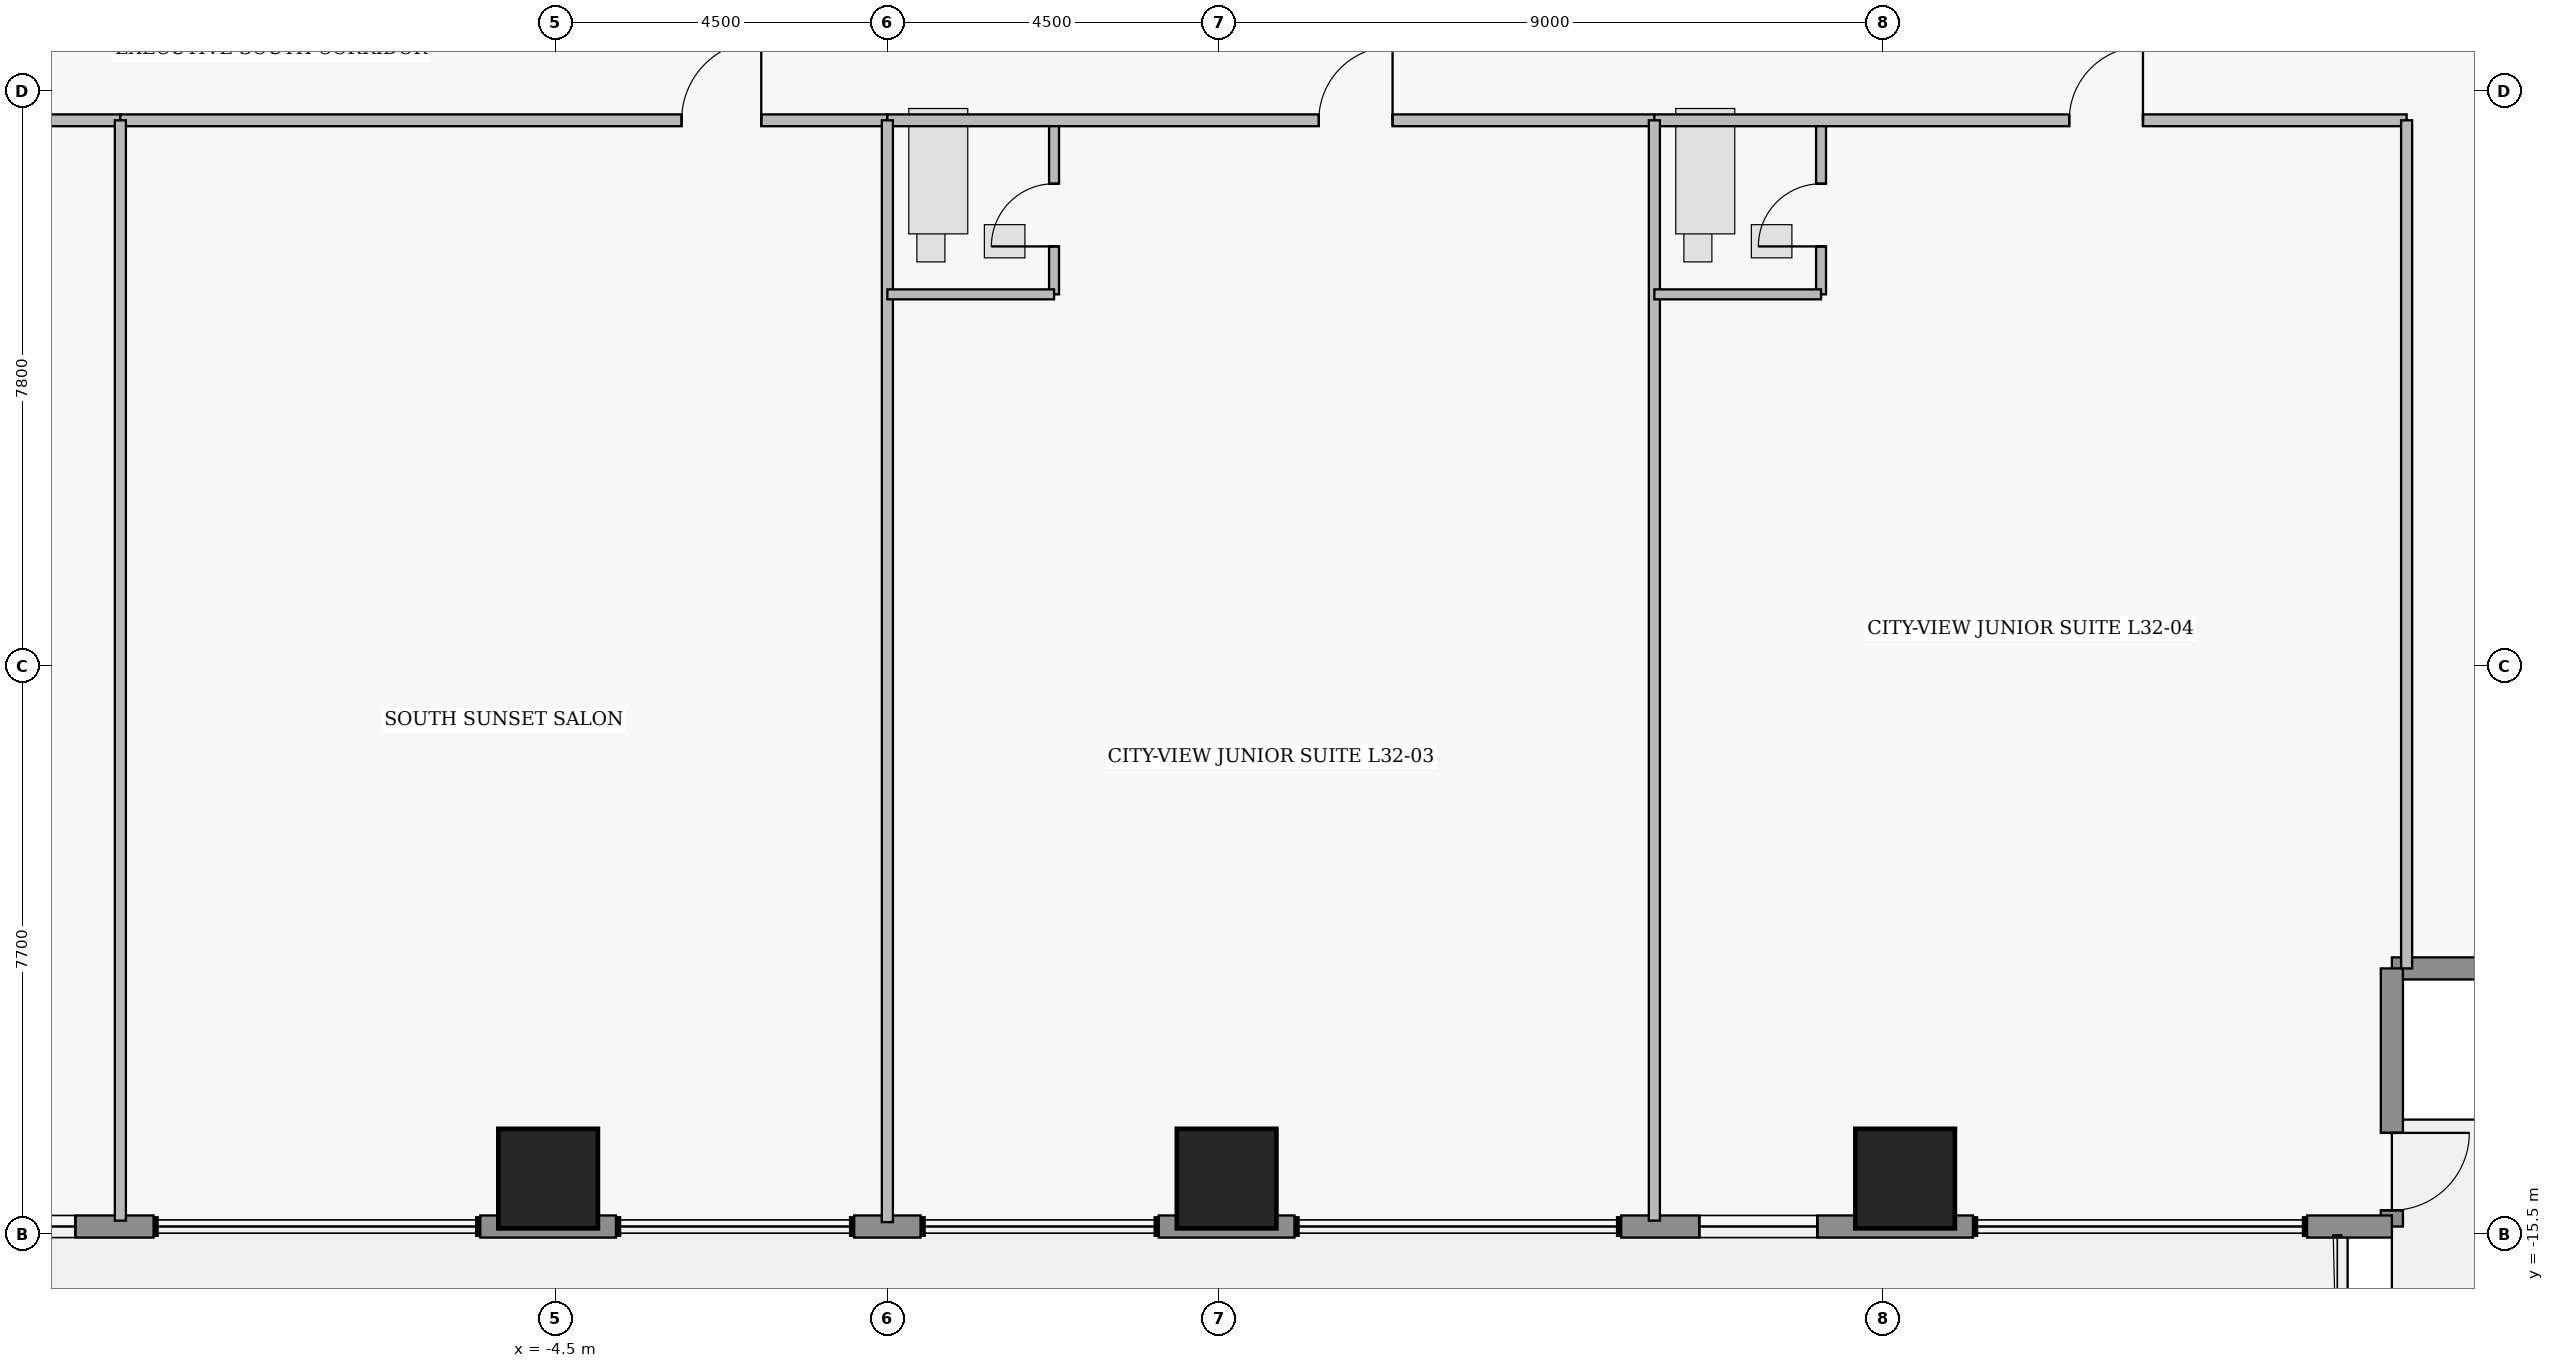
"""IFC4 building model, lengths in metres.
Left out: names, types, materials, properties, quantities, classifications, styles, units other than length and angle.
Written with IfcOpenShell. Run it as: python <this file> out.ifc"""

import sys

from ifc_helpers import new_model, si_unit, direction, frame, frame_2d, origin, origin_2d, place, context, subcontext, project, spatial, rectangle, extrude, element, fill, save


model = new_model("IFC4")
c1 = context("Model", 3, precision=1e-05, world=origin(), true_north=direction((0.0, 1.0)))
c2 = subcontext(c1, "Body", "Model", "MODEL_VIEW")
j1 = project(units=[si_unit("LENGTHUNIT", "METRE"), si_unit("PLANEANGLEUNIT", "RADIAN")], contexts=[c1])
p1 = place(None, origin())
s1 = spatial("IfcSite", under=j1, at=p1, CompositionType="ELEMENT")
p2 = place(p1, origin())
s2 = spatial("IfcBuilding", under=s1, at=p2, CompositionType="ELEMENT")
p3 = place(p2, frame((0.0, 0.0, 128.5)))
s3 = spatial("IfcBuildingStorey", under=s2, at=p3, CompositionType="ELEMENT", Elevation=128.5)
for number, where, z_axis, x_axis in (
    (1, (-4.6, -14.75, 0.0), (0.0, 0.0, 1.0), (1.0, 0.0, 0.0)),
    (2, (4.6, -14.75, 0.0), (0.0, 0.0, 1.0), (1.0, 0.0, 0.0)),
    (3, (13.8, -14.75, 0.0), (0.0, 0.0, 1.0), (1.0, 0.0, 0.0)),
):
    element("IfcColumn", number, at=place(p3, frame(where, z_axis=z_axis, x_axis=x_axis)), inside=s3, PredefinedType="COLUMN", context=c2, shape_type="SweptSolid", body=[
        extrude(rectangle(XDim=1.35, YDim=1.35, at=origin_2d()), origin(), (0.0, 0.0, 1.0), 3.65),
    ])
p4 = place(p3, frame((23.9, -11.9, 0.0), z_axis=(0.0, 0.0, 1.0), x_axis=(-1.0, 0.0, 0.0)))
e4 = element("IfcWall", 4, at=p4, inside=s3, PredefinedType="STANDARD", context=c2, shape_type="SweptSolid", body=[
    extrude(rectangle(XDim=3.5, YDim=0.3, at=frame_2d((1.75, 0.0))), origin(), (0.0, 0.0, 1.0), 3.43),
])
p5 = place(p4, frame((1.065, 0.0, 1.25)))
e5 = element("IfcOpeningElement", 5, at=p5, cuts=e4, PredefinedType="OPENING", context=c2, shape_type="SweptSolid", body=[
    extrude(rectangle(XDim=1.15, YDim=1.55, at=frame_2d((0.575, 0.775))), frame((0.0, 0.16, 0.0), z_axis=(0.0, -1.0, 0.0), x_axis=(1.0, 0.0, 0.0)), (0.0, 0.0, 1.0), 0.32),
])
p6 = place(p3, frame((20.4, -11.9, 0.0), z_axis=(0.0, 0.0, 1.0), x_axis=(0.0, -1.0, 0.0)))
e6 = element("IfcWall", 6, at=p6, inside=s3, PredefinedType="STANDARD", context=c2, shape_type="SweptSolid", body=[
    extrude(rectangle(XDim=3.5, YDim=0.3, at=frame_2d((1.75, 0.0))), origin(), (0.0, 0.0, 1.0), 3.43),
])
p7 = place(p6, frame((2.23, 0.0, 0.0)))
e7 = element("IfcOpeningElement", 7, at=p7, cuts=e6, PredefinedType="OPENING", context=c2, shape_type="SweptSolid", body=[
    extrude(rectangle(XDim=1.05, YDim=2.2, at=frame_2d((0.525, 1.1))), frame((0.0, 0.16, 0.0), z_axis=(0.0, -1.0, 0.0), x_axis=(1.0, 0.0, 0.0)), (0.0, 0.0, 1.0), 0.32),
])
p8 = place(p3, frame((20.4, -15.4, 0.0), z_axis=(0.0, 0.0, 1.0), x_axis=(-1.0, 0.0, 0.0)))
e8 = element("IfcWall", 8, at=p8, inside=s3, PredefinedType="STANDARD", context=c2, shape_type="SweptSolid", body=[
    extrude(rectangle(XDim=1.15, YDim=0.3, at=frame_2d((0.575, 0.0))), origin(), (0.0, 0.0, 1.0), 3.43),
])
p9 = place(p3, frame((14.72, -15.4, 0.0), z_axis=(0.0, 0.0, 1.0), x_axis=(-1.0, 0.0, 0.0)))
e9 = element("IfcWall", 9, at=p9, inside=s3, PredefinedType="STANDARD", context=c2, shape_type="SweptSolid", body=[
    extrude(rectangle(XDim=4.77, YDim=0.3, at=frame_2d((2.385, 0.0))), origin(), (0.0, 0.0, 1.0), 3.43),
])
p10 = place(p9, frame((2.11, 0.0, 0.85)))
e10 = element("IfcOpeningElement", 10, at=p10, cuts=e9, PredefinedType="OPENING", context=c2, shape_type="SweptSolid", body=[
    extrude(rectangle(XDim=1.6, YDim=1.8, at=frame_2d((0.8, 0.9))), frame((0.0, 0.16, 0.0), z_axis=(0.0, -1.0, 0.0), x_axis=(1.0, 0.0, 0.0)), (0.0, 0.0, 1.0), 0.32),
])
p11 = place(p3, frame((5.52, -15.4, 0.0), z_axis=(0.0, 0.0, 1.0), x_axis=(-1.0, 0.0, 0.0)))
e11 = element("IfcWall", 11, at=p11, inside=s3, PredefinedType="STANDARD", context=c2, shape_type="SweptSolid", body=[
    extrude(rectangle(XDim=1.84, YDim=0.3, at=frame_2d((0.92, 0.0))), origin(), (0.0, 0.0, 1.0), 3.43),
])
p12 = place(p3, frame((0.45, -15.4, 0.0), z_axis=(0.0, 0.0, 1.0), x_axis=(-1.0, 0.0, 0.0)))
e12 = element("IfcWall", 12, at=p12, inside=s3, PredefinedType="STANDARD", context=c2, shape_type="SweptSolid", body=[
    extrude(rectangle(XDim=0.9, YDim=0.3, at=frame_2d((0.45, 0.0))), origin(), (0.0, 0.0, 1.0), 3.43),
])
p13 = place(p3, frame((-3.68, -15.4, 0.0), z_axis=(0.0, 0.0, 1.0), x_axis=(-1.0, 0.0, 0.0)))
e13 = element("IfcWall", 13, at=p13, inside=s3, PredefinedType="STANDARD", context=c2, shape_type="SweptSolid", body=[
    extrude(rectangle(XDim=1.84, YDim=0.3, at=frame_2d((0.92, 0.0))), origin(), (0.0, 0.0, 1.0), 3.43),
])
p14 = place(p3, frame((-9.95, -15.4, 0.0), z_axis=(0.0, 0.0, 1.0), x_axis=(-1.0, 0.0, 0.0)))
e14 = element("IfcWall", 14, at=p14, inside=s3, PredefinedType="STANDARD", context=c2, shape_type="SweptSolid", body=[
    extrude(rectangle(XDim=10.45, YDim=0.3, at=frame_2d((5.225, 0.0))), origin(), (0.0, 0.0, 1.0), 3.43),
])
p15 = place(p14, frame((7.065, 0.0, 0.0)))
e15 = element("IfcOpeningElement", 15, at=p15, cuts=e14, PredefinedType="OPENING", context=c2, shape_type="SweptSolid", body=[
    extrude(rectangle(XDim=1.05, YDim=2.2, at=frame_2d((0.525, 1.1))), frame((0.0, 0.16, 0.0), z_axis=(0.0, -1.0, 0.0), x_axis=(1.0, 0.0, 0.0)), (0.0, 0.0, 1.0), 0.32),
])
p16 = place(p14, frame((1.06, 0.0, 0.85)))
e16 = element("IfcOpeningElement", 16, at=p16, cuts=e14, PredefinedType="OPENING", context=c2, shape_type="SweptSolid", body=[
    extrude(rectangle(XDim=1.6, YDim=1.8, at=frame_2d((0.8, 0.9))), frame((0.0, 0.16, 0.0), z_axis=(0.0, -1.0, 0.0), x_axis=(1.0, 0.0, 0.0)), (0.0, 0.0, 1.0), 0.32),
])
p17 = place(p14, frame((5.107, 0.0, 0.95)))
e17 = element("IfcOpeningElement", 17, at=p17, cuts=e14, PredefinedType="OPENING", context=c2, shape_type="SweptSolid", body=[
    extrude(rectangle(XDim=1.15, YDim=1.55, at=frame_2d((0.575, 0.775))), frame((0.0, 0.16, 0.0), z_axis=(0.0, -1.0, 0.0), x_axis=(1.0, 0.0, 0.0)), (0.0, 0.0, 1.0), 0.32),
])
p18 = place(p14, frame((8.712, 0.0, 0.95)))
e18 = element("IfcOpeningElement", 18, at=p18, cuts=e14, PredefinedType="OPENING", context=c2, shape_type="SweptSolid", body=[
    extrude(rectangle(XDim=1.15, YDim=1.55, at=frame_2d((0.575, 0.775))), frame((0.0, 0.16, 0.0), z_axis=(0.0, -1.0, 0.0), x_axis=(1.0, 0.0, 0.0)), (0.0, 0.0, 1.0), 0.32),
])
p19 = place(p3, frame((-20.6, -0.4, 0.0), z_axis=(0.0, 0.0, 1.0), x_axis=(1.0, 0.0, 0.0)))
e19 = element("IfcWall", 19, at=p19, inside=s3, PredefinedType="PARTITIONING", context=c2, shape_type="SweptSolid", body=[
    extrude(rectangle(XDim=10.2, YDim=0.16, at=frame_2d((5.1, 0.0))), origin(), (0.0, 0.0, 1.0), 3.43),
])
p20 = place(p19, frame((5.75, 0.0, 0.0)))
e20 = element("IfcOpeningElement", 20, at=p20, cuts=e19, PredefinedType="OPENING", context=c2, shape_type="SweptSolid", body=[
    extrude(rectangle(XDim=1.0, YDim=2.15, at=frame_2d((0.5, 1.075))), frame((0.0, 0.09, 0.0), z_axis=(0.0, -1.0, 0.0), x_axis=(1.0, 0.0, 0.0)), (0.0, 0.0, 1.0), 0.18),
])
p21 = place(p3, frame((-10.4, -0.4, 0.0), z_axis=(0.0, 0.0, 1.0), x_axis=(1.0, 0.0, 0.0)))
e21 = element("IfcWall", 21, at=p21, inside=s3, PredefinedType="PARTITIONING", context=c2, shape_type="SweptSolid", body=[
    extrude(rectangle(XDim=10.4, YDim=0.16, at=frame_2d((5.2, 0.0))), origin(), (0.0, 0.0, 1.0), 3.43),
])
p22 = place(p21, frame((7.61, 0.0, 0.0)))
e22 = element("IfcOpeningElement", 22, at=p22, cuts=e21, PredefinedType="OPENING", context=c2, shape_type="SweptSolid", body=[
    extrude(rectangle(XDim=1.08, YDim=2.18, at=frame_2d((0.54, 1.09))), frame((0.0, 0.09, 0.0), z_axis=(0.0, -1.0, 0.0), x_axis=(1.0, 0.0, 0.0)), (0.0, 0.0, 1.0), 0.18),
])
p23 = place(p3, frame((2.26, -2.76, 0.0), z_axis=(0.0, 0.0, 1.0), x_axis=(0.0, 1.0, 0.0)))
e23 = element("IfcWall", 23, at=p23, inside=s3, PredefinedType="PLUMBINGWALL", context=c2, shape_type="SweptSolid", body=[
    extrude(rectangle(XDim=2.36, YDim=0.135, at=frame_2d((1.18, 0.0))), origin(), (0.0, 0.0, 1.0), 3.43),
])
p24 = place(p23, frame((0.65, 0.0, 0.0)))
e24 = element("IfcOpeningElement", 24, at=p24, cuts=e23, PredefinedType="OPENING", context=c2, shape_type="SweptSolid", body=[
    extrude(rectangle(XDim=0.85, YDim=2.1, at=frame_2d((0.425, 1.05))), frame((0.0, 0.077, 0.0), z_axis=(0.0, -1.0, 0.0), x_axis=(1.0, 0.0, 0.0)), (0.0, 0.0, 1.0), 0.155),
])
p25 = place(p3, frame((0.0, -0.4, 0.0), z_axis=(0.0, 0.0, 1.0), x_axis=(1.0, 0.0, 0.0)))
e25 = element("IfcWall", 25, at=p25, inside=s3, PredefinedType="PARTITIONING", context=c2, shape_type="SweptSolid", body=[
    extrude(rectangle(XDim=10.4, YDim=0.16, at=frame_2d((5.2, 0.0))), origin(), (0.0, 0.0, 1.0), 3.43),
])
p26 = place(p25, frame((5.85, 0.0, 0.0)))
e26 = element("IfcOpeningElement", 26, at=p26, cuts=e25, PredefinedType="OPENING", context=c2, shape_type="SweptSolid", body=[
    extrude(rectangle(XDim=1.0, YDim=2.15, at=frame_2d((0.5, 1.075))), frame((0.0, 0.09, 0.0), z_axis=(0.0, -1.0, 0.0), x_axis=(1.0, 0.0, 0.0)), (0.0, 0.0, 1.0), 0.18),
])
p27 = place(p3, frame((12.66, -2.76, 0.0), z_axis=(0.0, 0.0, 1.0), x_axis=(0.0, 1.0, 0.0)))
e27 = element("IfcWall", 27, at=p27, inside=s3, PredefinedType="PLUMBINGWALL", context=c2, shape_type="SweptSolid", body=[
    extrude(rectangle(XDim=2.36, YDim=0.135, at=frame_2d((1.18, 0.0))), origin(), (0.0, 0.0, 1.0), 3.43),
])
p28 = place(p27, frame((0.65, 0.0, 0.0)))
e28 = element("IfcOpeningElement", 28, at=p28, cuts=e27, PredefinedType="OPENING", context=c2, shape_type="SweptSolid", body=[
    extrude(rectangle(XDim=0.85, YDim=2.1, at=frame_2d((0.425, 1.05))), frame((0.0, 0.077, 0.0), z_axis=(0.0, -1.0, 0.0), x_axis=(1.0, 0.0, 0.0)), (0.0, 0.0, 1.0), 0.155),
])
p29 = place(p3, frame((10.4, -0.4, 0.0), z_axis=(0.0, 0.0, 1.0), x_axis=(1.0, 0.0, 0.0)))
e29 = element("IfcWall", 29, at=p29, inside=s3, PredefinedType="PARTITIONING", context=c2, shape_type="SweptSolid", body=[
    extrude(rectangle(XDim=10.2, YDim=0.16, at=frame_2d((5.1, 0.0))), origin(), (0.0, 0.0, 1.0), 3.43),
])
p30 = place(p29, frame((5.625, 0.0, 0.0)))
e30 = element("IfcOpeningElement", 30, at=p30, cuts=e29, PredefinedType="OPENING", context=c2, shape_type="SweptSolid", body=[
    extrude(rectangle(XDim=1.0, YDim=2.15, at=frame_2d((0.5, 1.075))), frame((0.0, 0.09, 0.0), z_axis=(0.0, -1.0, 0.0), x_axis=(1.0, 0.0, 0.0)), (0.0, 0.0, 1.0), 0.18),
])
p31 = place(p3, frame((-10.4, -15.32, 0.0), z_axis=(0.0, 0.0, 1.0), x_axis=(0.0, 1.0, 0.0)))
e31 = element("IfcWall", 31, at=p31, inside=s3, PredefinedType="PARTITIONING", context=c2, shape_type="SweptSolid", body=[
    extrude(rectangle(XDim=14.92, YDim=0.15, at=frame_2d((7.46, 0.0))), origin(), (0.0, 0.0, 1.0), 3.43),
])
p32 = place(p3, frame((0.0, -15.34, 0.0), z_axis=(0.0, 0.0, 1.0), x_axis=(0.0, 1.0, 0.0)))
e32 = element("IfcWall", 32, at=p32, inside=s3, PredefinedType="PARTITIONING", context=c2, shape_type="SweptSolid", body=[
    extrude(rectangle(XDim=14.94, YDim=0.15, at=frame_2d((7.47, 0.0))), origin(), (0.0, 0.0, 1.0), 3.43),
])
p33 = place(p3, frame((0.0, -2.76, 0.0), z_axis=(0.0, 0.0, 1.0), x_axis=(1.0, 0.0, 0.0)))
e33 = element("IfcWall", 33, at=p33, inside=s3, PredefinedType="PLUMBINGWALL", context=c2, shape_type="SweptSolid", body=[
    extrude(rectangle(XDim=2.26, YDim=0.135, at=frame_2d((1.13, 0.0))), origin(), (0.0, 0.0, 1.0), 3.43),
])
p34 = place(p3, frame((10.4, -15.32, 0.0), z_axis=(0.0, 0.0, 1.0), x_axis=(0.0, 1.0, 0.0)))
e34 = element("IfcWall", 34, at=p34, inside=s3, PredefinedType="PARTITIONING", context=c2, shape_type="SweptSolid", body=[
    extrude(rectangle(XDim=14.92, YDim=0.15, at=frame_2d((7.46, 0.0))), origin(), (0.0, 0.0, 1.0), 3.43),
])
p35 = place(p3, frame((10.4, -2.76, 0.0), z_axis=(0.0, 0.0, 1.0), x_axis=(1.0, 0.0, 0.0)))
e35 = element("IfcWall", 35, at=p35, inside=s3, PredefinedType="PLUMBINGWALL", context=c2, shape_type="SweptSolid", body=[
    extrude(rectangle(XDim=2.26, YDim=0.135, at=frame_2d((1.13, 0.0))), origin(), (0.0, 0.0, 1.0), 3.43),
])
p36 = place(p3, frame((20.6, -11.9, 0.0), z_axis=(0.0, 0.0, 1.0), x_axis=(0.0, 1.0, 0.0)))
e36 = element("IfcWall", 36, at=p36, inside=s3, PredefinedType="PARTITIONING", context=c2, shape_type="SweptSolid", body=[
    extrude(rectangle(XDim=11.5, YDim=0.15, at=frame_2d((5.75, 0.0))), origin(), (0.0, 0.0, 1.0), 3.43),
])
p37 = place(p7, origin())
e37 = element("IfcDoor", 37, at=p37, inside=s3, OperationType="SINGLE_SWING_LEFT", PredefinedType="DOOR", context=c2, shape_type="SweptSolid", body=[
    extrude(rectangle(XDim=1.05, YDim=2.2, at=frame_2d((0.525, 1.1))), frame((0.0, 0.025, 0.0), z_axis=(0.0, -1.0, 0.0), x_axis=(1.0, 0.0, 0.0)), (0.0, 0.0, 1.0), 0.05),
])
fill(e7, e37)
p38 = place(p10, origin())
e38 = element("IfcWindow", 38, at=p38, inside=s3, PartitioningType="SINGLE_PANEL", PredefinedType="WINDOW", context=c2, shape_type="SweptSolid", body=[
    extrude(rectangle(XDim=1.6, YDim=1.8, at=frame_2d((0.8, 0.9))), frame((0.0, 0.03, 0.0), z_axis=(0.0, -1.0, 0.0), x_axis=(1.0, 0.0, 0.0)), (0.0, 0.0, 1.0), 0.06),
])
fill(e10, e38)
p39 = place(p16, origin())
e39 = element("IfcWindow", 39, at=p39, inside=s3, PartitioningType="SINGLE_PANEL", PredefinedType="WINDOW", context=c2, shape_type="SweptSolid", body=[
    extrude(rectangle(XDim=1.6, YDim=1.8, at=frame_2d((0.8, 0.9))), frame((0.0, 0.03, 0.0), z_axis=(0.0, -1.0, 0.0), x_axis=(1.0, 0.0, 0.0)), (0.0, 0.0, 1.0), 0.06),
])
fill(e16, e39)
p40 = place(p22, origin())
e40 = element("IfcDoor", 40, at=p40, inside=s3, OperationType="SINGLE_SWING_RIGHT", PredefinedType="DOOR", context=c2, shape_type="SweptSolid", body=[
    extrude(rectangle(XDim=1.08, YDim=2.18, at=frame_2d((0.54, 1.09))), frame((0.0, 0.025, 0.0), z_axis=(0.0, -1.0, 0.0), x_axis=(1.0, 0.0, 0.0)), (0.0, 0.0, 1.0), 0.05),
])
fill(e22, e40)
p41 = place(p24, origin())
e41 = element("IfcDoor", 41, at=p41, inside=s3, OperationType="SINGLE_SWING_LEFT", PredefinedType="DOOR", context=c2, shape_type="SweptSolid", body=[
    extrude(rectangle(XDim=0.85, YDim=2.1, at=frame_2d((0.425, 1.05))), frame((0.0, 0.025, 0.0), z_axis=(0.0, -1.0, 0.0), x_axis=(1.0, 0.0, 0.0)), (0.0, 0.0, 1.0), 0.05),
])
fill(e24, e41)
p42 = place(p26, origin())
e42 = element("IfcDoor", 42, at=p42, inside=s3, OperationType="SINGLE_SWING_RIGHT", PredefinedType="DOOR", context=c2, shape_type="SweptSolid", body=[
    extrude(rectangle(XDim=1.0, YDim=2.15, at=frame_2d((0.5, 1.075))), frame((0.0, 0.025, 0.0), z_axis=(0.0, -1.0, 0.0), x_axis=(1.0, 0.0, 0.0)), (0.0, 0.0, 1.0), 0.05),
])
fill(e26, e42)
p43 = place(p28, origin())
e43 = element("IfcDoor", 43, at=p43, inside=s3, OperationType="SINGLE_SWING_LEFT", PredefinedType="DOOR", context=c2, shape_type="SweptSolid", body=[
    extrude(rectangle(XDim=0.85, YDim=2.1, at=frame_2d((0.425, 1.05))), frame((0.0, 0.025, 0.0), z_axis=(0.0, -1.0, 0.0), x_axis=(1.0, 0.0, 0.0)), (0.0, 0.0, 1.0), 0.05),
])
fill(e28, e43)
p44 = place(p30, origin())
e44 = element("IfcDoor", 44, at=p44, inside=s3, OperationType="SINGLE_SWING_RIGHT", PredefinedType="DOOR", context=c2, shape_type="SweptSolid", body=[
    extrude(rectangle(XDim=1.0, YDim=2.15, at=frame_2d((0.5, 1.075))), frame((0.0, 0.025, 0.0), z_axis=(0.0, -1.0, 0.0), x_axis=(1.0, 0.0, 0.0)), (0.0, 0.0, 1.0), 0.05),
])
fill(e30, e44)
save(model, sys.argv[1])
